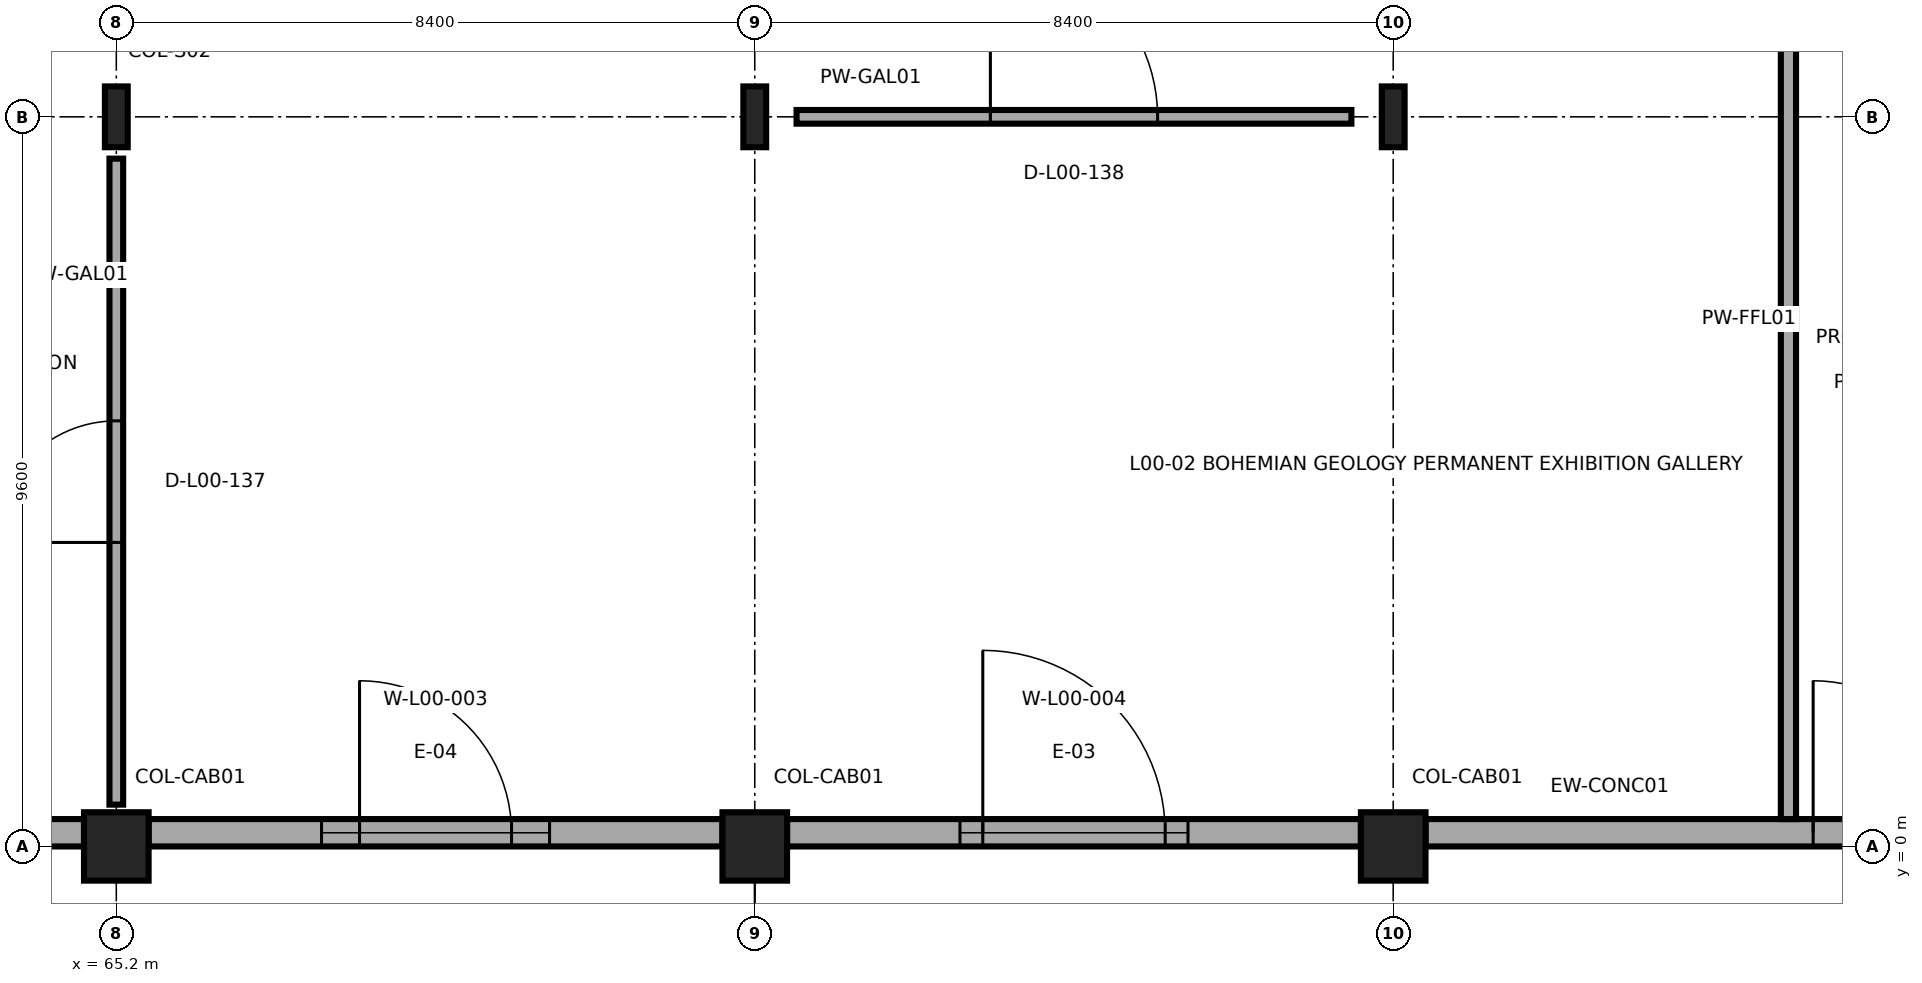
"""IFC4 building model, lengths in metres.
Left out: names, types, materials, properties, quantities, classifications, styles, units other than length and angle.
Written with IfcOpenShell. Run it as: python <this file> out.ifc"""

import sys

from ifc_helpers import new_model, si_unit, direction, frame, frame_2d, origin, origin_2d, place, context, subcontext, project, spatial, rectangle, i_section, extrude, element, fill, save


model = new_model("IFC4")
c1 = context("Model", 3, precision=1e-05, world=origin(), true_north=direction((0.0, 1.0)))
c2 = subcontext(c1, "Body", "Model", "MODEL_VIEW")
j1 = project(units=[si_unit("LENGTHUNIT", "METRE"), si_unit("PLANEANGLEUNIT", "RADIAN")], contexts=[c1])
p1 = place(None, origin())
s1 = spatial("IfcSite", under=j1, at=p1, CompositionType="ELEMENT")
p2 = place(p1, origin())
s2 = spatial("IfcBuilding", under=s1, at=p2, CompositionType="ELEMENT")
p3 = place(p2, origin())
s3 = spatial("IfcBuildingStorey", under=s2, at=p3, CompositionType="ELEMENT", Elevation=0.0)
p4 = place(p3, frame((65.2, 0.0, 0.0), z_axis=(0.0, 0.0, 1.0), x_axis=(1.0, 0.0, 0.0)))
e1 = element("IfcColumn", 1, at=p4, inside=s3, PredefinedType="COLUMN", context=c2, shape_type="SweptSolid", body=[
    extrude(rectangle(XDim=0.85, YDim=0.9, at=origin_2d()), origin(), (0.0, 0.0, 1.0), 8.4),
])
p5 = place(p3, frame((65.2, 9.6, 0.0), z_axis=(0.0, 0.0, 1.0), x_axis=(1.0, 0.0, 0.0)))
e2 = element("IfcColumn", 2, at=p5, inside=s3, PredefinedType="COLUMN", context=c2, shape_type="SweptSolid", body=[
    extrude(i_section(OverallWidth=0.3, OverallDepth=0.8, WebThickness=0.018, FlangeThickness=0.033, FilletRadius=0.03, at=origin_2d()), origin(), (0.0, 0.0, 1.0), 8.4),
])
p6 = place(p3, frame((73.6, 0.0, 0.0), z_axis=(0.0, 0.0, 1.0), x_axis=(1.0, 0.0, 0.0)))
e3 = element("IfcColumn", 3, at=p6, inside=s3, PredefinedType="COLUMN", context=c2, shape_type="SweptSolid", body=[
    extrude(rectangle(XDim=0.85, YDim=0.9, at=origin_2d()), origin(), (0.0, 0.0, 1.0), 8.4),
])
p7 = place(p3, frame((73.6, 9.6, 0.0), z_axis=(0.0, 0.0, 1.0), x_axis=(1.0, 0.0, 0.0)))
e4 = element("IfcColumn", 4, at=p7, inside=s3, PredefinedType="COLUMN", context=c2, shape_type="SweptSolid", body=[
    extrude(i_section(OverallWidth=0.3, OverallDepth=0.8, WebThickness=0.018, FlangeThickness=0.033, FilletRadius=0.03, at=origin_2d()), origin(), (0.0, 0.0, 1.0), 8.4),
])
p8 = place(p3, frame((82.0, 0.0, 0.0), z_axis=(0.0, 0.0, 1.0), x_axis=(1.0, 0.0, 0.0)))
e5 = element("IfcColumn", 5, at=p8, inside=s3, PredefinedType="COLUMN", context=c2, shape_type="SweptSolid", body=[
    extrude(rectangle(XDim=0.85, YDim=0.9, at=origin_2d()), origin(), (0.0, 0.0, 1.0), 8.4),
])
p9 = place(p3, frame((82.0, 9.6, 0.0), z_axis=(0.0, 0.0, 1.0), x_axis=(1.0, 0.0, 0.0)))
e6 = element("IfcColumn", 6, at=p9, inside=s3, PredefinedType="COLUMN", context=c2, shape_type="SweptSolid", body=[
    extrude(i_section(OverallWidth=0.3, OverallDepth=0.8, WebThickness=0.018, FlangeThickness=0.033, FilletRadius=0.03, at=origin_2d()), origin(), (0.0, 0.0, 1.0), 8.4),
])
p10 = place(p3, frame((57.225, 0.18, 0.0), z_axis=(0.0, 0.0, 1.0), x_axis=(1.0, 0.0, 0.0)))
e7 = element("IfcWall", 7, at=p10, inside=s3, PredefinedType="SOLIDWALL", context=c2, shape_type="SweptSolid", body=[
    extrude(rectangle(XDim=7.55, YDim=0.36, at=frame_2d((3.775, 0.0))), origin(), (0.0, 0.0, 1.0), 7.235),
])
p11 = place(p10, frame((2.575, 0.0, 0.0)))
e8 = element("IfcOpeningElement", 8, at=p11, cuts=e7, PredefinedType="OPENING", context=c2, shape_type="SweptSolid", body=[
    extrude(rectangle(XDim=2.4, YDim=2.6, at=frame_2d((1.2, 1.3))), frame((0.0, 0.19, 0.0), z_axis=(0.0, -1.0, 0.0), x_axis=(1.0, 0.0, 0.0)), (0.0, 0.0, 1.0), 0.38),
])
p12 = place(p10, frame((2.275, 0.0, 3.2)))
e9 = element("IfcOpeningElement", 9, at=p12, cuts=e7, PredefinedType="OPENING", context=c2, shape_type="SweptSolid", body=[
    extrude(rectangle(XDim=3.0, YDim=2.2, at=frame_2d((1.5, 1.1))), frame((0.0, 0.19, 0.0), z_axis=(0.0, -1.0, 0.0), x_axis=(1.0, 0.0, 0.0)), (0.0, 0.0, 1.0), 0.38),
])
p13 = place(p3, frame((65.625, 0.18, 0.0), z_axis=(0.0, 0.0, 1.0), x_axis=(1.0, 0.0, 0.0)))
e10 = element("IfcWall", 10, at=p13, inside=s3, PredefinedType="SOLIDWALL", context=c2, shape_type="SweptSolid", body=[
    extrude(rectangle(XDim=7.55, YDim=0.36, at=frame_2d((3.775, 0.0))), origin(), (0.0, 0.0, 1.0), 7.235),
])
p14 = place(p13, frame((2.775, 0.0, 0.0)))
e11 = element("IfcOpeningElement", 11, at=p14, cuts=e10, PredefinedType="OPENING", context=c2, shape_type="SweptSolid", body=[
    extrude(rectangle(XDim=2.0, YDim=2.4, at=frame_2d((1.0, 1.2))), frame((0.0, 0.19, 0.0), z_axis=(0.0, -1.0, 0.0), x_axis=(1.0, 0.0, 0.0)), (0.0, 0.0, 1.0), 0.38),
])
p15 = place(p13, frame((2.275, 0.0, 3.2)))
e12 = element("IfcOpeningElement", 12, at=p15, cuts=e10, PredefinedType="OPENING", context=c2, shape_type="SweptSolid", body=[
    extrude(rectangle(XDim=3.0, YDim=2.2, at=frame_2d((1.5, 1.1))), frame((0.0, 0.19, 0.0), z_axis=(0.0, -1.0, 0.0), x_axis=(1.0, 0.0, 0.0)), (0.0, 0.0, 1.0), 0.38),
])
p16 = place(p3, frame((74.025, 0.18, 0.0), z_axis=(0.0, 0.0, 1.0), x_axis=(1.0, 0.0, 0.0)))
e13 = element("IfcWall", 13, at=p16, inside=s3, PredefinedType="SOLIDWALL", context=c2, shape_type="SweptSolid", body=[
    extrude(rectangle(XDim=7.55, YDim=0.36, at=frame_2d((3.775, 0.0))), origin(), (0.0, 0.0, 1.0), 7.235),
])
p17 = place(p16, frame((2.575, 0.0, 0.0)))
e14 = element("IfcOpeningElement", 14, at=p17, cuts=e13, PredefinedType="OPENING", context=c2, shape_type="SweptSolid", body=[
    extrude(rectangle(XDim=2.4, YDim=2.6, at=frame_2d((1.2, 1.3))), frame((0.0, 0.19, 0.0), z_axis=(0.0, -1.0, 0.0), x_axis=(1.0, 0.0, 0.0)), (0.0, 0.0, 1.0), 0.38),
])
p18 = place(p16, frame((2.275, 0.0, 3.2)))
e15 = element("IfcOpeningElement", 15, at=p18, cuts=e13, PredefinedType="OPENING", context=c2, shape_type="SweptSolid", body=[
    extrude(rectangle(XDim=3.0, YDim=2.2, at=frame_2d((1.5, 1.1))), frame((0.0, 0.19, 0.0), z_axis=(0.0, -1.0, 0.0), x_axis=(1.0, 0.0, 0.0)), (0.0, 0.0, 1.0), 0.38),
])
p19 = place(p3, frame((82.425, 0.18, 0.0), z_axis=(0.0, 0.0, 1.0), x_axis=(1.0, 0.0, 0.0)))
e16 = element("IfcWall", 16, at=p19, inside=s3, PredefinedType="SOLIDWALL", context=c2, shape_type="SweptSolid", body=[
    extrude(rectangle(XDim=7.55, YDim=0.36, at=frame_2d((3.775, 0.0))), origin(), (0.0, 0.0, 1.0), 7.235),
])
p20 = place(p19, frame((5.1, 0.0, 0.0)))
e17 = element("IfcOpeningElement", 17, at=p20, cuts=e16, PredefinedType="OPENING", context=c2, shape_type="SweptSolid", body=[
    extrude(rectangle(XDim=2.0, YDim=2.4, at=frame_2d((1.0, 1.2))), frame((0.0, 0.19, 0.0), z_axis=(0.0, -1.0, 0.0), x_axis=(1.0, 0.0, 0.0)), (0.0, 0.0, 1.0), 0.38),
])
p21 = place(p3, frame((87.2, 0.36, 0.0), z_axis=(0.0, 0.0, 1.0), x_axis=(0.0, 1.0, 0.0)))
e18 = element("IfcWall", 18, at=p21, inside=s3, PredefinedType="SOLIDWALL", context=c2, shape_type="SweptSolid", body=[
    extrude(rectangle(XDim=11.64, YDim=0.2, at=frame_2d((5.82, 0.0))), origin(), (0.0, 0.0, 1.0), 7.232),
])
p22 = place(p3, frame((65.2, 0.55, 0.0), z_axis=(0.0, 0.0, 1.0), x_axis=(0.0, 1.0, 0.0)))
e19 = element("IfcWall", 19, at=p22, inside=s3, PredefinedType="PARTITIONING", context=c2, shape_type="SweptSolid", body=[
    extrude(rectangle(XDim=8.5, YDim=0.18, at=frame_2d((4.25, 0.0))), origin(), (0.0, 0.0, 1.0), 7.812),
])
p23 = place(p22, frame((3.45, 0.0, 0.0)))
e20 = element("IfcOpeningElement", 20, at=p23, cuts=e19, PredefinedType="OPENING", context=c2, shape_type="SweptSolid", body=[
    extrude(rectangle(XDim=1.6, YDim=2.4, at=frame_2d((0.8, 1.2))), frame((0.0, 0.1, 0.0), z_axis=(0.0, -1.0, 0.0), x_axis=(1.0, 0.0, 0.0)), (0.0, 0.0, 1.0), 0.2),
])
p24 = place(p3, frame((74.15, 9.6, 0.0), z_axis=(0.0, 0.0, 1.0), x_axis=(1.0, 0.0, 0.0)))
e21 = element("IfcWall", 21, at=p24, inside=s3, PredefinedType="PARTITIONING", context=c2, shape_type="SweptSolid", body=[
    extrude(rectangle(XDim=7.3, YDim=0.18, at=frame_2d((3.65, 0.0))), origin(), (0.0, 0.0, 1.0), 7.582),
])
p25 = place(p24, frame((2.55, 0.0, 0.0)))
e22 = element("IfcOpeningElement", 22, at=p25, cuts=e21, PredefinedType="OPENING", context=c2, shape_type="SweptSolid", body=[
    extrude(rectangle(XDim=2.2, YDim=2.6, at=frame_2d((1.1, 1.3))), frame((0.0, 0.1, 0.0), z_axis=(0.0, -1.0, 0.0), x_axis=(1.0, 0.0, 0.0)), (0.0, 0.0, 1.0), 0.2),
])
p26 = place(p14, frame((2.0, 0.0, 0.0), z_axis=(0.0, 0.0, 1.0), x_axis=(-1.0, 0.0, 0.0)))
e23 = element("IfcDoor", 23, at=p26, inside=s3, OperationType="DOUBLE_DOOR_SINGLE_SWING", PredefinedType="DOOR", context=c2, shape_type="SweptSolid", body=[
    extrude(rectangle(XDim=2.0, YDim=2.4, at=frame_2d((1.0, 1.2))), frame((0.0, 0.025, 0.0), z_axis=(0.0, -1.0, 0.0), x_axis=(1.0, 0.0, 0.0)), (0.0, 0.0, 1.0), 0.05),
])
fill(e11, e23)
p27 = place(p15, origin())
e24 = element("IfcWindow", 24, at=p27, inside=s3, PartitioningType="SINGLE_PANEL", PredefinedType="WINDOW", context=c2, shape_type="SweptSolid", body=[
    extrude(rectangle(XDim=3.0, YDim=2.2, at=frame_2d((1.5, 1.1))), frame((0.0, 0.03, 0.0), z_axis=(0.0, -1.0, 0.0), x_axis=(1.0, 0.0, 0.0)), (0.0, 0.0, 1.0), 0.06),
])
fill(e12, e24)
p28 = place(p17, frame((2.4, 0.0, 0.0), z_axis=(0.0, 0.0, 1.0), x_axis=(-1.0, 0.0, 0.0)))
e25 = element("IfcDoor", 25, at=p28, inside=s3, OperationType="DOUBLE_DOOR_SINGLE_SWING", PredefinedType="DOOR", context=c2, shape_type="SweptSolid", body=[
    extrude(rectangle(XDim=2.4, YDim=2.6, at=frame_2d((1.2, 1.3))), frame((0.0, 0.025, 0.0), z_axis=(0.0, -1.0, 0.0), x_axis=(1.0, 0.0, 0.0)), (0.0, 0.0, 1.0), 0.05),
])
fill(e14, e25)
p29 = place(p18, origin())
e26 = element("IfcWindow", 26, at=p29, inside=s3, PartitioningType="SINGLE_PANEL", PredefinedType="WINDOW", context=c2, shape_type="SweptSolid", body=[
    extrude(rectangle(XDim=3.0, YDim=2.2, at=frame_2d((1.5, 1.1))), frame((0.0, 0.03, 0.0), z_axis=(0.0, -1.0, 0.0), x_axis=(1.0, 0.0, 0.0)), (0.0, 0.0, 1.0), 0.06),
])
fill(e15, e26)
p30 = place(p20, frame((2.0, 0.0, 0.0), z_axis=(0.0, 0.0, 1.0), x_axis=(-1.0, 0.0, 0.0)))
e27 = element("IfcDoor", 27, at=p30, inside=s3, OperationType="DOUBLE_DOOR_SINGLE_SWING", PredefinedType="DOOR", context=c2, shape_type="SweptSolid", body=[
    extrude(rectangle(XDim=2.0, YDim=2.4, at=frame_2d((1.0, 1.2))), frame((0.0, 0.025, 0.0), z_axis=(0.0, -1.0, 0.0), x_axis=(1.0, 0.0, 0.0)), (0.0, 0.0, 1.0), 0.05),
])
fill(e17, e27)
p31 = place(p23, origin())
e28 = element("IfcDoor", 28, at=p31, inside=s3, OperationType="DOUBLE_DOOR_SINGLE_SWING", PredefinedType="DOOR", context=c2, shape_type="SweptSolid", body=[
    extrude(rectangle(XDim=1.6, YDim=2.4, at=frame_2d((0.8, 1.2))), frame((0.0, 0.025, 0.0), z_axis=(0.0, -1.0, 0.0), x_axis=(1.0, 0.0, 0.0)), (0.0, 0.0, 1.0), 0.05),
])
fill(e20, e28)
p32 = place(p25, origin())
e29 = element("IfcDoor", 29, at=p32, inside=s3, OperationType="DOUBLE_DOOR_SINGLE_SWING", PredefinedType="DOOR", context=c2, shape_type="SweptSolid", body=[
    extrude(rectangle(XDim=2.2, YDim=2.6, at=frame_2d((1.1, 1.3))), frame((0.0, 0.025, 0.0), z_axis=(0.0, -1.0, 0.0), x_axis=(1.0, 0.0, 0.0)), (0.0, 0.0, 1.0), 0.05),
])
fill(e22, e29)
save(model, sys.argv[1])
